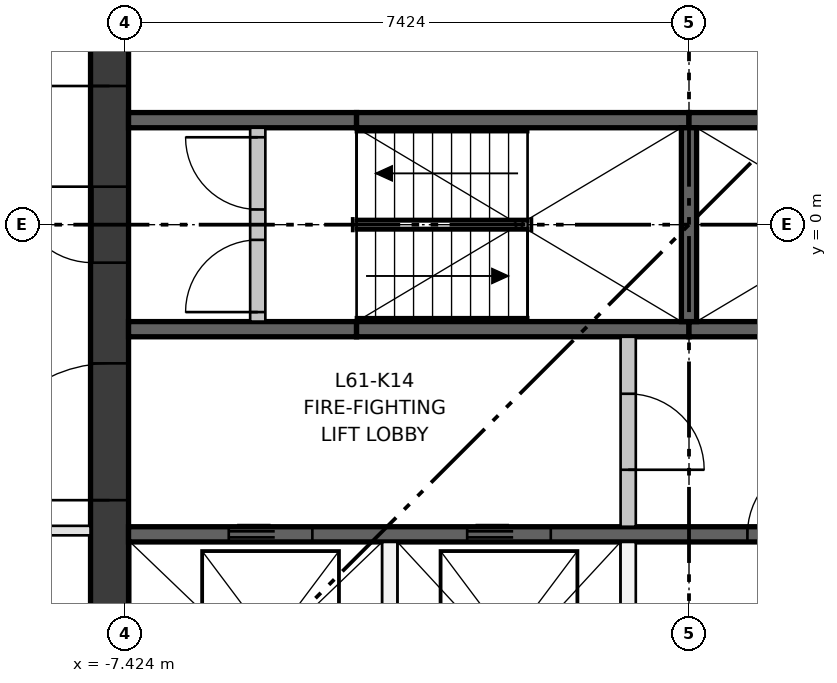
"""IFC4 building model, lengths in metres.
Left out: names, types, materials, properties, quantities, classifications, styles, units other than length and angle.
Written with IfcOpenShell. Run it as: python <this file> out.ifc"""

import sys

from ifc_helpers import new_model, si_unit, direction, frame, frame_2d, origin, place, context, subcontext, project, spatial, rectangle, extrude, element, fill, save


model = new_model("IFC4")
c1 = context("Model", 3, precision=1e-05, world=origin(), true_north=direction((0.0, 1.0)))
c2 = subcontext(c1, "Body", "Model", "MODEL_VIEW")
j1 = project(units=[si_unit("LENGTHUNIT", "METRE"), si_unit("PLANEANGLEUNIT", "RADIAN")], contexts=[c1])
p1 = place(None, origin())
s1 = spatial("IfcSite", under=j1, at=p1, CompositionType="ELEMENT")
p2 = place(p1, origin())
s2 = spatial("IfcBuilding", under=s1, at=p2, CompositionType="ELEMENT")
p3 = place(p2, frame((0.0, 0.0, 224.5)))
s3 = spatial("IfcBuildingStorey", under=s2, at=p3, CompositionType="ELEMENT", Elevation=224.5)
p4 = place(p3, frame((-7.624, -7.374, 0.0), z_axis=(0.0, 0.0, 1.0), x_axis=(0.0, 1.0, 0.0)))
e1 = element("IfcWall", 1, at=p4, inside=s3, PredefinedType="SHEAR", context=c2, shape_type="SweptSolid", body=[
    extrude(rectangle(XDim=14.748, YDim=0.5, at=frame_2d((7.374, 0.0))), origin(), (0.0, 0.0, 1.0), 3.35),
])
p5 = place(p4, frame((6.874, 0.0, 0.0)))
e2 = element("IfcOpeningElement", 2, at=p5, cuts=e1, PredefinedType="OPENING", context=c2, shape_type="SweptSolid", body=[
    extrude(rectangle(XDim=1.0, YDim=2.1, at=frame_2d((0.5, 1.05))), frame((0.0, 0.26, 0.0), z_axis=(0.0, -1.0, 0.0), x_axis=(1.0, 0.0, 0.0)), (0.0, 0.0, 1.0), 0.52),
])
p6 = place(p4, frame((3.75, 0.0, 0.0)))
e3 = element("IfcOpeningElement", 3, at=p6, cuts=e1, PredefinedType="OPENING", context=c2, shape_type="SweptSolid", body=[
    extrude(rectangle(XDim=1.8, YDim=2.1, at=frame_2d((0.9, 1.05))), frame((0.0, 0.26, 0.0), z_axis=(0.0, -1.0, 0.0), x_axis=(1.0, 0.0, 0.0)), (0.0, 0.0, 1.0), 0.52),
])
p7 = place(p4, frame((9.198, 0.0, 0.0)))
e4 = element("IfcOpeningElement", 4, at=p7, cuts=e1, PredefinedType="OPENING", context=c2, shape_type="SweptSolid", body=[
    extrude(rectangle(XDim=1.8, YDim=2.1, at=frame_2d((0.9, 1.05))), frame((0.0, 0.26, 0.0), z_axis=(0.0, -1.0, 0.0), x_axis=(1.0, 0.0, 0.0)), (0.0, 0.0, 1.0), 0.52),
])
p8 = place(p3, frame((-7.374, -4.074, 0.0), z_axis=(0.0, 0.0, 1.0), x_axis=(1.0, 0.0, 0.0)))
e5 = element("IfcWall", 5, at=p8, inside=s3, PredefinedType="SHEAR", context=c2, shape_type="SweptSolid", body=[
    extrude(rectangle(XDim=14.748, YDim=0.2, at=frame_2d((7.374, 0.0))), origin(), (0.0, 0.0, 1.0), 3.0),
])
p9 = place(p8, frame((1.319, 0.0, 0.0)))
e6 = element("IfcOpeningElement", 6, at=p9, cuts=e5, PredefinedType="OPENING", context=c2, shape_type="SweptSolid", body=[
    extrude(rectangle(XDim=1.1, YDim=2.1, at=frame_2d((0.55, 1.05))), frame((0.0, 0.11, 0.0), z_axis=(0.0, -1.0, 0.0), x_axis=(1.0, 0.0, 0.0)), (0.0, 0.0, 1.0), 0.22),
])
p10 = place(p8, frame((4.456, 0.0, 0.0)))
e7 = element("IfcOpeningElement", 7, at=p10, cuts=e5, PredefinedType="OPENING", context=c2, shape_type="SweptSolid", body=[
    extrude(rectangle(XDim=1.1, YDim=2.1, at=frame_2d((0.55, 1.05))), frame((0.0, 0.11, 0.0), z_axis=(0.0, -1.0, 0.0), x_axis=(1.0, 0.0, 0.0)), (0.0, 0.0, 1.0), 0.22),
])
p11 = place(p8, frame((8.143, 0.0, 0.0)))
e8 = element("IfcOpeningElement", 8, at=p11, cuts=e5, PredefinedType="OPENING", context=c2, shape_type="SweptSolid", body=[
    extrude(rectangle(XDim=1.0, YDim=2.1, at=frame_2d((0.5, 1.05))), frame((0.0, 0.11, 0.0), z_axis=(0.0, -1.0, 0.0), x_axis=(1.0, 0.0, 0.0)), (0.0, 0.0, 1.0), 0.22),
])
p12 = place(p8, frame((12.379, 0.0, 0.0)))
e9 = element("IfcOpeningElement", 9, at=p12, cuts=e5, PredefinedType="OPENING", context=c2, shape_type="SweptSolid", body=[
    extrude(rectangle(XDim=0.8, YDim=2.1, at=frame_2d((0.4, 1.05))), frame((0.0, 0.11, 0.0), z_axis=(0.0, -1.0, 0.0), x_axis=(1.0, 0.0, 0.0)), (0.0, 0.0, 1.0), 0.22),
])
p13 = place(p3, frame((-7.374, -1.375, 0.0), z_axis=(0.0, 0.0, 1.0), x_axis=(1.0, 0.0, 0.0)))
e10 = element("IfcWall", 10, at=p13, inside=s3, PredefinedType="SHEAR", context=c2, shape_type="SweptSolid", body=[
    extrude(rectangle(XDim=3.0, YDim=0.2, at=frame_2d((1.5, 0.0))), origin(), (0.0, 0.0, 1.0), 3.0),
])
for number, where, z_axis, x_axis in (
    (11, (-4.374, -1.375, 0.0), (0.0, 0.0, 1.0), (1.0, 0.0, 0.0)),
    (12, (0.0, -1.375, 0.0), (0.0, 0.0, 1.0), (1.0, 0.0, 0.0)),
):
    element("IfcWall", number, at=place(p3, frame(where, z_axis=z_axis, x_axis=x_axis)), inside=s3, PredefinedType="SHEAR", context=c2, shape_type="SweptSolid", body=[
        extrude(rectangle(XDim=4.374, YDim=0.2, at=frame_2d((2.187, 0.0))), origin(), (0.0, 0.0, 1.0), 3.0),
    ])
p14 = place(p3, frame((-7.374, 1.375, 0.0), z_axis=(0.0, 0.0, 1.0), x_axis=(1.0, 0.0, 0.0)))
e13 = element("IfcWall", 13, at=p14, inside=s3, PredefinedType="SHEAR", context=c2, shape_type="SweptSolid", body=[
    extrude(rectangle(XDim=3.0, YDim=0.2, at=frame_2d((1.5, 0.0))), origin(), (0.0, 0.0, 1.0), 3.0),
])
for number, where, z_axis, x_axis in (
    (14, (-4.374, 1.375, 0.0), (0.0, 0.0, 1.0), (1.0, 0.0, 0.0)),
    (15, (0.0, 1.375, 0.0), (0.0, 0.0, 1.0), (1.0, 0.0, 0.0)),
):
    element("IfcWall", number, at=place(p3, frame(where, z_axis=z_axis, x_axis=x_axis)), inside=s3, PredefinedType="SHEAR", context=c2, shape_type="SweptSolid", body=[
        extrude(rectangle(XDim=4.374, YDim=0.2, at=frame_2d((2.187, 0.0))), origin(), (0.0, 0.0, 1.0), 3.0),
    ])
p15 = place(p3, frame((0.0, -1.275, 0.0), z_axis=(0.0, 0.0, 1.0), x_axis=(0.0, 1.0, 0.0)))
e16 = element("IfcWall", 16, at=p15, inside=s3, PredefinedType="SHEAR", context=c2, shape_type="SweptSolid", body=[
    extrude(rectangle(XDim=2.55, YDim=0.2, at=frame_2d((1.275, 0.0))), origin(), (0.0, 0.0, 1.0), 3.0),
])
for number, where, z_axis, x_axis in (
    (17, (-3.937, -7.374, 0.0), (0.0, 0.0, 1.0), (0.0, 1.0, 0.0)),
    (18, (-0.8, -7.374, 0.0), (0.0, 0.0, 1.0), (0.0, 1.0, 0.0)),
):
    element("IfcWall", number, at=place(p3, frame(where, z_axis=z_axis, x_axis=x_axis)), inside=s3, PredefinedType="PARTITIONING", context=c2, shape_type="SweptSolid", body=[
        extrude(rectangle(XDim=3.2, YDim=0.2, at=frame_2d((1.6, 0.0))), origin(), (0.0, 0.0, 1.0), 3.0),
    ])
p16 = place(p3, frame((-0.8, -3.974, 0.0), z_axis=(0.0, 0.0, 1.0), x_axis=(0.0, 1.0, 0.0)))
e19 = element("IfcWall", 19, at=p16, inside=s3, PredefinedType="PARTITIONING", context=c2, shape_type="SweptSolid", body=[
    extrude(rectangle(XDim=2.499, YDim=0.2, at=frame_2d((1.25, 0.0))), origin(), (0.0, 0.0, 1.0), 3.0),
])
p17 = place(p16, frame((0.75, 0.0, 0.0)))
e20 = element("IfcOpeningElement", 20, at=p17, cuts=e19, PredefinedType="OPENING", context=c2, shape_type="SweptSolid", body=[
    extrude(rectangle(XDim=1.0, YDim=2.1, at=frame_2d((0.5, 1.05))), frame((0.0, 0.11, 0.0), z_axis=(0.0, -1.0, 0.0), x_axis=(1.0, 0.0, 0.0)), (0.0, 0.0, 1.0), 0.22),
])
p18 = place(p3, frame((-5.674, -1.275, 0.0), z_axis=(0.0, 0.0, 1.0), x_axis=(0.0, 1.0, 0.0)))
e21 = element("IfcWall", 21, at=p18, inside=s3, PredefinedType="PARTITIONING", context=c2, shape_type="SweptSolid", body=[
    extrude(rectangle(XDim=2.55, YDim=0.2, at=frame_2d((1.275, 0.0))), origin(), (0.0, 0.0, 1.0), 3.0),
])
p19 = place(p18, frame((0.125, 0.0, 0.0)))
e22 = element("IfcOpeningElement", 22, at=p19, cuts=e21, PredefinedType="OPENING", context=c2, shape_type="SweptSolid", body=[
    extrude(rectangle(XDim=0.95, YDim=2.1, at=frame_2d((0.475, 1.05))), frame((0.0, 0.11, 0.0), z_axis=(0.0, -1.0, 0.0), x_axis=(1.0, 0.0, 0.0)), (0.0, 0.0, 1.0), 0.22),
])
p20 = place(p18, frame((1.475, 0.0, 0.0)))
e23 = element("IfcOpeningElement", 23, at=p20, cuts=e21, PredefinedType="OPENING", context=c2, shape_type="SweptSolid", body=[
    extrude(rectangle(XDim=0.95, YDim=2.1, at=frame_2d((0.475, 1.05))), frame((0.0, 0.11, 0.0), z_axis=(0.0, -1.0, 0.0), x_axis=(1.0, 0.0, 0.0)), (0.0, 0.0, 1.0), 0.22),
])
p21 = place(p3, frame((-7.874, -4.024, 0.0), z_axis=(0.0, 0.0, 1.0), x_axis=(-1.0, 0.0, 0.0)))
e24 = element("IfcWall", 24, at=p21, inside=s3, PredefinedType="PARTITIONING", context=c2, shape_type="SweptSolid", body=[
    extrude(rectangle(XDim=2.422, YDim=0.125, at=frame_2d((1.211, 0.0))), origin(), (0.0, 0.0, 1.0), 3.0),
])
p22 = place(p21, frame((0.7, 0.0, 0.0)))
e25 = element("IfcOpeningElement", 25, at=p22, cuts=e24, PredefinedType="OPENING", context=c2, shape_type="SweptSolid", body=[
    extrude(rectangle(XDim=1.0, YDim=2.1, at=frame_2d((0.5, 1.05))), frame((0.0, 0.073, 0.0), z_axis=(0.0, -1.0, 0.0), x_axis=(1.0, 0.0, 0.0)), (0.0, 0.0, 1.0), 0.145),
])
p23 = place(p9, origin())
e26 = element("IfcDoor", 26, at=p23, inside=s3, OperationType="DOUBLE_DOOR_SLIDING", PredefinedType="DOOR", context=c2, shape_type="SweptSolid", body=[
    extrude(rectangle(XDim=1.1, YDim=2.1, at=frame_2d((0.55, 1.05))), frame((0.0, 0.025, 0.0), z_axis=(0.0, -1.0, 0.0), x_axis=(1.0, 0.0, 0.0)), (0.0, 0.0, 1.0), 0.05),
])
fill(e6, e26)
p24 = place(p10, origin())
e27 = element("IfcDoor", 27, at=p24, inside=s3, OperationType="DOUBLE_DOOR_SLIDING", PredefinedType="DOOR", context=c2, shape_type="SweptSolid", body=[
    extrude(rectangle(XDim=1.1, YDim=2.1, at=frame_2d((0.55, 1.05))), frame((0.0, 0.025, 0.0), z_axis=(0.0, -1.0, 0.0), x_axis=(1.0, 0.0, 0.0)), (0.0, 0.0, 1.0), 0.05),
])
fill(e7, e27)
p25 = place(p19, origin())
e28 = element("IfcDoor", 28, at=p25, inside=s3, OperationType="SINGLE_SWING_LEFT", PredefinedType="DOOR", context=c2, shape_type="SweptSolid", body=[
    extrude(rectangle(XDim=0.95, YDim=2.1, at=frame_2d((0.475, 1.05))), frame((0.0, 0.025, 0.0), z_axis=(0.0, -1.0, 0.0), x_axis=(1.0, 0.0, 0.0)), (0.0, 0.0, 1.0), 0.05),
])
fill(e22, e28)
p26 = place(p20, origin())
e29 = element("IfcDoor", 29, at=p26, inside=s3, OperationType="SINGLE_SWING_RIGHT", PredefinedType="DOOR", context=c2, shape_type="SweptSolid", body=[
    extrude(rectangle(XDim=0.95, YDim=2.1, at=frame_2d((0.475, 1.05))), frame((0.0, 0.025, 0.0), z_axis=(0.0, -1.0, 0.0), x_axis=(1.0, 0.0, 0.0)), (0.0, 0.0, 1.0), 0.05),
])
fill(e23, e29)
p27 = place(p17, frame((1.0, 0.0, 0.0), z_axis=(0.0, 0.0, 1.0), x_axis=(-1.0, 0.0, 0.0)))
e30 = element("IfcDoor", 30, at=p27, inside=s3, OperationType="SINGLE_SWING_LEFT", PredefinedType="DOOR", context=c2, shape_type="SweptSolid", body=[
    extrude(rectangle(XDim=1.0, YDim=2.1, at=frame_2d((0.5, 1.05))), frame((0.0, 0.025, 0.0), z_axis=(0.0, -1.0, 0.0), x_axis=(1.0, 0.0, 0.0)), (0.0, 0.0, 1.0), 0.05),
])
fill(e20, e30)
p28 = place(p11, origin())
e31 = element("IfcDoor", 31, at=p28, inside=s3, OperationType="SINGLE_SWING_RIGHT", PredefinedType="DOOR", context=c2, shape_type="SweptSolid", body=[
    extrude(rectangle(XDim=1.0, YDim=2.1, at=frame_2d((0.5, 1.05))), frame((0.0, 0.025, 0.0), z_axis=(0.0, -1.0, 0.0), x_axis=(1.0, 0.0, 0.0)), (0.0, 0.0, 1.0), 0.05),
])
fill(e8, e31)
p29 = place(p5, origin())
e32 = element("IfcDoor", 32, at=p29, inside=s3, OperationType="SINGLE_SWING_RIGHT", PredefinedType="DOOR", context=c2, shape_type="SweptSolid", body=[
    extrude(rectangle(XDim=1.0, YDim=2.1, at=frame_2d((0.5, 1.05))), frame((0.0, 0.25, 0.0), z_axis=(0.0, -1.0, 0.0), x_axis=(1.0, 0.0, 0.0)), (0.0, 0.0, 1.0), 0.05),
])
fill(e2, e32)
p30 = place(p6, origin())
e33 = element("IfcDoor", 33, at=p30, inside=s3, OperationType="DOUBLE_DOOR_SINGLE_SWING", PredefinedType="DOOR", context=c2, shape_type="SweptSolid", body=[
    extrude(rectangle(XDim=1.8, YDim=2.1, at=frame_2d((0.9, 1.05))), frame((0.0, 0.025, 0.0), z_axis=(0.0, -1.0, 0.0), x_axis=(1.0, 0.0, 0.0)), (0.0, 0.0, 1.0), 0.05),
])
fill(e3, e33)
p31 = place(p7, origin())
e34 = element("IfcDoor", 34, at=p31, inside=s3, OperationType="DOUBLE_DOOR_SINGLE_SWING", PredefinedType="DOOR", context=c2, shape_type="SweptSolid", body=[
    extrude(rectangle(XDim=1.8, YDim=2.1, at=frame_2d((0.9, 1.05))), frame((0.0, 0.025, 0.0), z_axis=(0.0, -1.0, 0.0), x_axis=(1.0, 0.0, 0.0)), (0.0, 0.0, 1.0), 0.05),
])
fill(e4, e34)
save(model, sys.argv[1])
